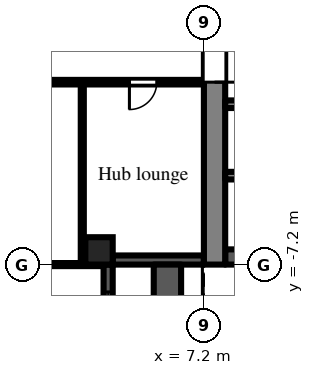
"""IFC4 building model, lengths in metres.
Left out: names, types, materials, properties, quantities, classifications, styles, units other than length and angle.
Written with IfcOpenShell. Run it as: python <this file> out.ifc"""

import sys

from ifc_helpers import new_model, si_unit, direction, frame, frame_2d, origin, origin_2d, place, context, subcontext, project, spatial, rectangle, extrude, element, fill, save


model = new_model("IFC4")
c1 = context("Model", 3, precision=1e-05, world=origin(), true_north=direction((0.0, 1.0)))
c2 = subcontext(c1, "Body", "Model", "MODEL_VIEW")
j1 = project(units=[si_unit("LENGTHUNIT", "METRE"), si_unit("PLANEANGLEUNIT", "RADIAN")], contexts=[c1])
p1 = place(None, origin())
s1 = spatial("IfcSite", under=j1, at=p1, CompositionType="ELEMENT")
p2 = place(p1, origin())
s2 = spatial("IfcBuilding", under=s1, at=p2, CompositionType="ELEMENT")
p3 = place(p2, frame((0.0, 0.0, 35.7)))
s3 = spatial("IfcBuildingStorey", under=s2, at=p3, CompositionType="ELEMENT", Elevation=35.7)
p4 = place(p3, frame((3.75, -6.75, 0.0), z_axis=(0.0, 0.0, 1.0), x_axis=(1.0, 0.0, 0.0)))
e1 = element("IfcColumn", 1, at=p4, inside=s3, PredefinedType="COLUMN", context=c2, shape_type="SweptSolid", body=[
    extrude(rectangle(XDim=0.9, YDim=0.9, at=origin_2d()), origin(), (0.0, 0.0, 1.0), 3.0),
])
p5 = place(p3, frame((4.05, -14.4, 0.0), z_axis=(0.0, 0.0, 1.0), x_axis=(0.0, 1.0, 0.0)))
e2 = element("IfcWall", 2, at=p5, inside=s3, PredefinedType="SOLIDWALL", context=c2, shape_type="SweptSolid", body=[
    extrude(rectangle(XDim=7.2, YDim=0.3, at=frame_2d((3.6, 0.0))), origin(), (0.0, 0.0, 1.0), 2.1),
])
p6 = place(p5, frame((3.0, 0.0, 0.0)))
e3 = element("IfcOpeningElement", 3, at=p6, cuts=e2, PredefinedType="OPENING", context=c2, shape_type="SweptSolid", body=[
    extrude(rectangle(XDim=1.2, YDim=2.05, at=frame_2d((0.6, 1.025))), frame((0.0, 0.16, 0.0), z_axis=(0.0, -1.0, 0.0), x_axis=(1.0, 0.0, 0.0)), (0.0, 0.0, 1.0), 0.32),
])
p7 = place(p5, frame((0.9, 0.0, 0.2)))
e4 = element("IfcOpeningElement", 4, at=p7, cuts=e2, PredefinedType="OPENING", context=c2, shape_type="SweptSolid", body=[
    extrude(rectangle(XDim=1.8, YDim=1.85, at=frame_2d((0.9, 0.925))), frame((0.0, 0.16, 0.0), z_axis=(0.0, -1.0, 0.0), x_axis=(1.0, 0.0, 0.0)), (0.0, 0.0, 1.0), 0.32),
])
p8 = place(p5, frame((4.5, 0.0, 0.2)))
e5 = element("IfcOpeningElement", 5, at=p8, cuts=e2, PredefinedType="OPENING", context=c2, shape_type="SweptSolid", body=[
    extrude(rectangle(XDim=1.8, YDim=1.85, at=frame_2d((0.9, 0.925))), frame((0.0, 0.16, 0.0), z_axis=(0.0, -1.0, 0.0), x_axis=(1.0, 0.0, 0.0)), (0.0, 0.0, 1.0), 0.32),
])
p9 = place(p3, frame((4.2, -7.05, 0.0), z_axis=(0.0, 0.0, 1.0), x_axis=(1.0, 0.0, 0.0)))
e6 = element("IfcWall", 6, at=p9, inside=s3, PredefinedType="SOLIDWALL", context=c2, shape_type="SweptSolid", body=[
    extrude(rectangle(XDim=3.0, YDim=0.3, at=frame_2d((1.5, 0.0))), origin(), (0.0, 0.0, 1.0), 2.1),
])
p10 = place(p3, frame((6.0, -14.4, 0.0), z_axis=(0.0, 0.0, 1.0), x_axis=(0.0, 1.0, 0.0)))
e7 = element("IfcWall", 7, at=p10, inside=s3, PredefinedType="PARAPET", context=c2, shape_type="SweptSolid", body=[
    extrude(rectangle(XDim=7.2, YDim=0.9, at=frame_2d((3.6, 0.0))), origin(), (0.0, 0.0, 1.0), 0.8),
])
p11 = place(p3, frame((7.55, -7.2, 0.0), z_axis=(0.0, 0.0, 1.0), x_axis=(0.0, 1.0, 0.0)))
e8 = element("IfcWall", 8, at=p11, inside=s3, PredefinedType="SHEAR", context=c2, shape_type="SweptSolid", body=[
    extrude(rectangle(XDim=14.4, YDim=0.7, at=frame_2d((7.2, 0.0))), origin(), (0.0, 0.0, 1.0), 2.575),
])
p12 = place(p11, frame((6.0, 0.0, 0.0)))
e9 = element("IfcOpeningElement", 9, at=p12, cuts=e8, PredefinedType="OPENING", context=c2, shape_type="SweptSolid", body=[
    extrude(rectangle(XDim=2.4, YDim=2.2, at=frame_2d((1.2, 1.1))), frame((0.0, 0.36, 0.0), z_axis=(0.0, -1.0, 0.0), x_axis=(1.0, 0.0, 0.0)), (0.0, 0.0, 1.0), 0.72),
])
p13 = place(p3, frame((7.9, -6.95, 0.0), z_axis=(0.0, 0.0, 1.0), x_axis=(1.0, 0.0, 0.0)))
e10 = element("IfcWall", 10, at=p13, inside=s3, PredefinedType="SHEAR", context=c2, shape_type="SweptSolid", body=[
    extrude(rectangle(XDim=12.95, YDim=0.5, at=frame_2d((6.475, 0.0))), origin(), (0.0, 0.0, 1.0), 2.575),
])
p14 = place(p3, frame((7.9, -1.925, 0.0), z_axis=(0.0, 0.0, 1.0), x_axis=(1.0, 0.0, 0.0)))
e11 = element("IfcWall", 11, at=p14, inside=s3, PredefinedType="SHEAR", context=c2, shape_type="SweptSolid", body=[
    extrude(rectangle(XDim=12.95, YDim=0.25, at=frame_2d((6.475, 0.0))), origin(), (0.0, 0.0, 1.0), 2.575),
])
p15 = place(p14, frame((4.825, 0.0, 0.0)))
e12 = element("IfcOpeningElement", 12, at=p15, cuts=e11, PredefinedType="OPENING", context=c2, shape_type="SweptSolid", body=[
    extrude(rectangle(XDim=1.1, YDim=2.1, at=frame_2d((0.55, 1.05))), frame((0.0, 0.135, 0.0), z_axis=(0.0, -1.0, 0.0), x_axis=(1.0, 0.0, 0.0)), (0.0, 0.0, 1.0), 0.27),
])
p16 = place(p14, frame((7.025, 0.0, 0.0)))
e13 = element("IfcOpeningElement", 13, at=p16, cuts=e11, PredefinedType="OPENING", context=c2, shape_type="SweptSolid", body=[
    extrude(rectangle(XDim=1.1, YDim=2.1, at=frame_2d((0.55, 1.05))), frame((0.0, 0.135, 0.0), z_axis=(0.0, -1.0, 0.0), x_axis=(1.0, 0.0, 0.0)), (0.0, 0.0, 1.0), 0.27),
])
p17 = place(p14, frame((9.225, 0.0, 0.0)))
e14 = element("IfcOpeningElement", 14, at=p17, cuts=e11, PredefinedType="OPENING", context=c2, shape_type="SweptSolid", body=[
    extrude(rectangle(XDim=1.1, YDim=2.1, at=frame_2d((0.55, 1.05))), frame((0.0, 0.135, 0.0), z_axis=(0.0, -1.0, 0.0), x_axis=(1.0, 0.0, 0.0)), (0.0, 0.0, 1.0), 0.27),
])
p18 = place(p14, frame((0.525, 0.0, 0.0)))
e15 = element("IfcOpeningElement", 15, at=p18, cuts=e11, PredefinedType="OPENING", context=c2, shape_type="SweptSolid", body=[
    extrude(rectangle(XDim=0.9, YDim=2.1, at=frame_2d((0.45, 1.05))), frame((0.0, 0.135, 0.0), z_axis=(0.0, -1.0, 0.0), x_axis=(1.0, 0.0, 0.0)), (0.0, 0.0, 1.0), 0.27),
])
p19 = place(p14, frame((2.625, 0.0, 0.0)))
e16 = element("IfcOpeningElement", 16, at=p19, cuts=e11, PredefinedType="OPENING", context=c2, shape_type="SweptSolid", body=[
    extrude(rectangle(XDim=1.1, YDim=2.1, at=frame_2d((0.55, 1.05))), frame((0.0, 0.135, 0.0), z_axis=(0.0, -1.0, 0.0), x_axis=(1.0, 0.0, 0.0)), (0.0, 0.0, 1.0), 0.27),
])
p20 = place(p3, frame((7.9, -4.275, 0.0), z_axis=(0.0, 0.0, 1.0), x_axis=(1.0, 0.0, 0.0)))
e17 = element("IfcWall", 17, at=p20, inside=s3, PredefinedType="SHEAR", context=c2, shape_type="SweptSolid", body=[
    extrude(rectangle(XDim=1.95, YDim=0.25, at=frame_2d((0.975, 0.0))), origin(), (0.0, 0.0, 1.0), 2.575),
])
p21 = place(p3, frame((1.275, -7.2, 0.0), z_axis=(0.0, 0.0, 1.0), x_axis=(1.0, 0.0, 0.0)))
e18 = element("IfcWall", 18, at=p21, inside=s3, PredefinedType="PARTITIONING", context=c2, shape_type="SweptSolid", body=[
    extrude(rectangle(XDim=2.625, YDim=0.1, at=frame_2d((1.312, 0.0))), origin(), (0.0, 0.0, 1.0), 2.575),
])
p22 = place(p3, frame((1.275, -1.2, 0.0), z_axis=(0.0, 0.0, 1.0), x_axis=(1.0, 0.0, 0.0)))
e19 = element("IfcWall", 19, at=p22, inside=s3, PredefinedType="PARTITIONING", context=c2, shape_type="SweptSolid", body=[
    extrude(rectangle(XDim=5.925, YDim=0.15, at=frame_2d((2.962, 0.0))), origin(), (0.0, 0.0, 1.0), 2.575),
])
p23 = place(p22, frame((3.475, 0.0, 0.0)))
e20 = element("IfcOpeningElement", 20, at=p23, cuts=e19, PredefinedType="OPENING", context=c2, shape_type="SweptSolid", body=[
    extrude(rectangle(XDim=0.9, YDim=2.1, at=frame_2d((0.45, 1.05))), frame((0.0, 0.085, 0.0), z_axis=(0.0, -1.0, 0.0), x_axis=(1.0, 0.0, 0.0)), (0.0, 0.0, 1.0), 0.17),
])
p24 = place(p3, frame((3.2, -7.15, 0.0), z_axis=(0.0, 0.0, 1.0), x_axis=(0.0, 1.0, 0.0)))
e21 = element("IfcWall", 21, at=p24, inside=s3, PredefinedType="PARTITIONING", context=c2, shape_type="SweptSolid", body=[
    extrude(rectangle(XDim=5.875, YDim=0.1, at=frame_2d((2.938, 0.0))), origin(), (0.0, 0.0, 1.0), 2.575),
])
p25 = place(p8, origin())
e22 = element("IfcWindow", 22, at=p25, inside=s3, PartitioningType="SINGLE_PANEL", PredefinedType="WINDOW", context=c2, shape_type="SweptSolid", body=[
    extrude(rectangle(XDim=1.8, YDim=1.85, at=frame_2d((0.9, 0.925))), frame((0.0, 0.03, 0.0), z_axis=(0.0, -1.0, 0.0), x_axis=(1.0, 0.0, 0.0)), (0.0, 0.0, 1.0), 0.06),
])
fill(e5, e22)
p26 = place(p12, frame((2.4, 0.0, 0.0), z_axis=(0.0, 0.0, 1.0), x_axis=(-1.0, 0.0, 0.0)))
e23 = element("IfcDoor", 23, at=p26, inside=s3, OperationType="DOUBLE_DOOR_DOUBLE_SWING", PredefinedType="DOOR", context=c2, shape_type="SweptSolid", body=[
    extrude(rectangle(XDim=2.4, YDim=2.2, at=frame_2d((1.2, 1.1))), frame((0.0, 0.025, 0.0), z_axis=(0.0, -1.0, 0.0), x_axis=(1.0, 0.0, 0.0)), (0.0, 0.0, 1.0), 0.05),
])
fill(e9, e23)
p27 = place(p23, frame((0.9, 0.0, 0.0), z_axis=(0.0, 0.0, 1.0), x_axis=(-1.0, 0.0, 0.0)))
e24 = element("IfcDoor", 24, at=p27, inside=s3, OperationType="SINGLE_SWING_RIGHT", PredefinedType="DOOR", context=c2, shape_type="SweptSolid", body=[
    extrude(rectangle(XDim=0.9, YDim=2.1, at=frame_2d((0.45, 1.05))), frame((0.0, 0.025, 0.0), z_axis=(0.0, -1.0, 0.0), x_axis=(1.0, 0.0, 0.0)), (0.0, 0.0, 1.0), 0.05),
])
fill(e20, e24)
save(model, sys.argv[1])
